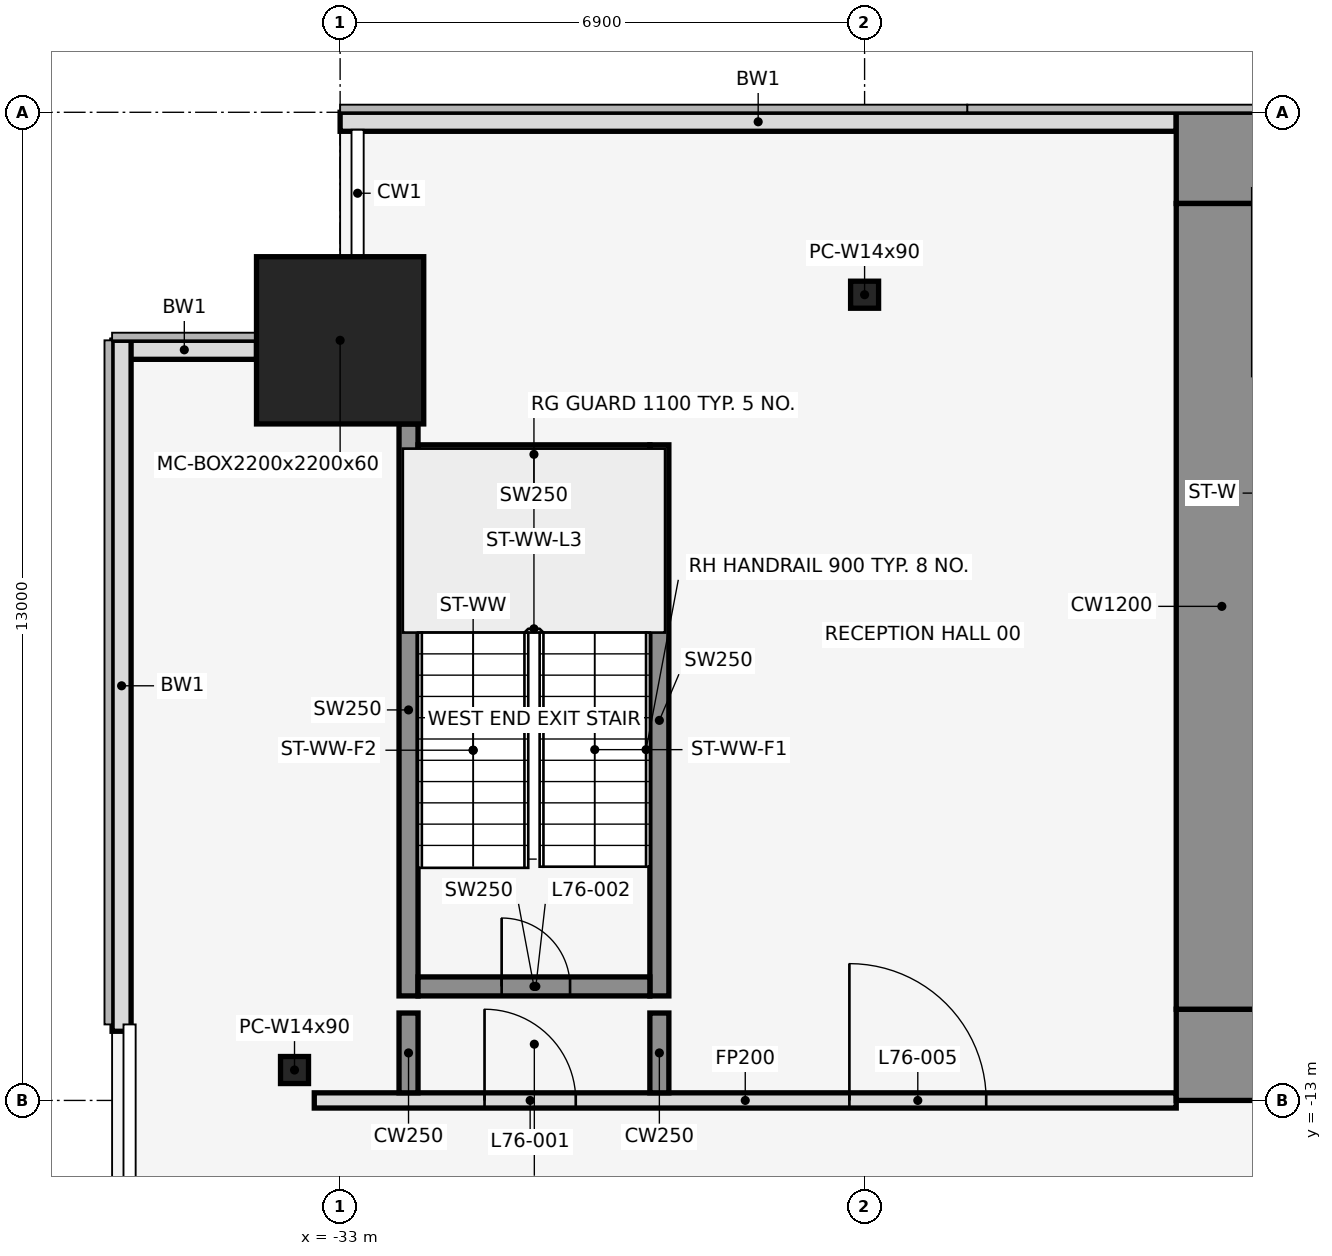
"""IFC4 building model, lengths in metres.
Left out: names, types, materials, properties, quantities, classifications, styles, units other than length and angle.
Written with IfcOpenShell. Run it as: python <this file> out.ifc"""

import sys

from ifc_helpers import new_model, si_unit, direction, frame, frame_2d, origin, origin_2d, place, context, subcontext, project, spatial, rectangle, hollow_rectangle, i_section, extrude, element, fill, save


model = new_model("IFC4")
c1 = context("Model", 3, precision=1e-05, world=origin(), true_north=direction((0.0, 1.0)))
c2 = subcontext(c1, "Body", "Model", "MODEL_VIEW")
j1 = project(units=[si_unit("LENGTHUNIT", "METRE"), si_unit("PLANEANGLEUNIT", "RADIAN")], contexts=[c1])
p1 = place(None, origin())
s1 = spatial("IfcSite", under=j1, at=p1, CompositionType="ELEMENT")
p2 = place(p1, origin())
s2 = spatial("IfcBuilding", under=s1, at=p2, CompositionType="ELEMENT")
p3 = place(p2, frame((0.0, 0.0, 338.0)))
s3 = spatial("IfcBuildingStorey", under=s2, at=p3, CompositionType="ELEMENT", Elevation=338.0)
p4 = place(p3, frame((-33.0, -3.0, 0.0), z_axis=(0.0, 0.0, 1.0), x_axis=(1.0, 0.0, 0.0)))
e1 = element("IfcColumn", 1, at=p4, inside=s3, PredefinedType="COLUMN", context=c2, shape_type="SweptSolid", body=[
    extrude(hollow_rectangle(XDim=2.2, YDim=2.2, WallThickness=0.06, at=origin_2d()), origin(), (0.0, 0.0, 1.0), 4.5),
])
for number, where, z_axis, x_axis in (
    (2, (-26.1, -2.4, 0.0), (0.0, 0.0, 1.0), (1.0, 0.0, 0.0)),
    (3, (-33.6, -12.6, 0.0), (0.0, 0.0, 1.0), (1.0, 0.0, 0.0)),
):
    element("IfcColumn", number, at=place(p3, frame(where, z_axis=z_axis, x_axis=x_axis)), inside=s3, PredefinedType="COLUMN", context=c2, shape_type="SweptSolid", body=[
        extrude(i_section(OverallWidth=0.368, OverallDepth=0.356, WebThickness=0.011, FlangeThickness=0.018, at=origin_2d()), origin(), (0.0, 0.0, 1.0), 4.5),
    ])
p5 = place(p3, frame((-22.0, -0.125, 0.0), z_axis=(0.0, 0.0, 1.0), x_axis=(-1.0, 0.0, 0.0)))
e4 = element("IfcWall", 4, at=p5, inside=s3, PredefinedType="STANDARD", context=c2, shape_type="SweptSolid", body=[
    extrude(rectangle(XDim=11.0, YDim=0.25, at=frame_2d((5.5, 0.0))), origin(), (0.0, 0.0, 1.0), 4.3),
])
p6 = place(p3, frame((-34.1, -3.125, 0.0), z_axis=(0.0, 0.0, 1.0), x_axis=(-1.0, 0.0, 0.0)))
e5 = element("IfcWall", 5, at=p6, inside=s3, PredefinedType="STANDARD", context=c2, shape_type="SweptSolid", body=[
    extrude(rectangle(XDim=1.9, YDim=0.25, at=frame_2d((0.95, 0.0))), origin(), (0.0, 0.0, 1.0), 4.3),
])
p7 = place(p3, frame((-35.875, -3.0, 0.0), z_axis=(0.0, 0.0, 1.0), x_axis=(0.0, -1.0, 0.0)))
e6 = element("IfcWall", 6, at=p7, inside=s3, PredefinedType="STANDARD", context=c2, shape_type="SweptSolid", body=[
    extrude(rectangle(XDim=9.09, YDim=0.25, at=frame_2d((4.545, 0.0))), origin(), (0.0, 0.0, 1.0), 4.3),
])
p8 = place(p3, frame((-32.1, -11.625, 0.0), z_axis=(0.0, 0.0, 1.0), x_axis=(0.0, 1.0, 0.0)))
e7 = element("IfcWall", 7, at=p8, inside=s3, PredefinedType="SHEAR", context=c2, shape_type="SweptSolid", body=[
    extrude(rectangle(XDim=7.525, YDim=0.25, at=frame_2d((3.762, 0.0))), origin(), (0.0, 0.0, 1.0), 4.5),
])
p9 = place(p3, frame((-28.8, -11.625, 0.0), z_axis=(0.0, 0.0, 1.0), x_axis=(0.0, 1.0, 0.0)))
e8 = element("IfcWall", 8, at=p9, inside=s3, PredefinedType="SHEAR", context=c2, shape_type="SweptSolid", body=[
    extrude(rectangle(XDim=7.25, YDim=0.25, at=frame_2d((3.625, 0.0))), origin(), (0.0, 0.0, 1.0), 4.5),
])
p10 = place(p3, frame((-31.975, -11.5, 0.0), z_axis=(0.0, 0.0, 1.0), x_axis=(1.0, 0.0, 0.0)))
e9 = element("IfcWall", 9, at=p10, inside=s3, PredefinedType="SHEAR", context=c2, shape_type="SweptSolid", body=[
    extrude(rectangle(XDim=3.05, YDim=0.25, at=frame_2d((1.525, 0.0))), origin(), (0.0, 0.0, 1.0), 4.5),
])
p11 = place(p10, frame((1.1, 0.0, 0.0)))
e10 = element("IfcOpeningElement", 10, at=p11, cuts=e9, PredefinedType="OPENING", context=c2, shape_type="SweptSolid", body=[
    extrude(rectangle(XDim=0.9, YDim=2.1, at=frame_2d((0.45, 1.05))), frame((0.0, 0.137, 0.0), z_axis=(0.0, -1.0, 0.0), x_axis=(1.0, 0.0, 0.0)), (0.0, 0.0, 1.0), 0.274),
])
p12 = place(p3, frame((-31.975, -4.5, 0.0), z_axis=(0.0, 0.0, 1.0), x_axis=(1.0, 0.0, 0.0)))
e11 = element("IfcWall", 11, at=p12, inside=s3, PredefinedType="SHEAR", context=c2, shape_type="SweptSolid", body=[
    extrude(rectangle(XDim=3.05, YDim=0.25, at=frame_2d((1.525, 0.0))), origin(), (0.0, 0.0, 1.0), 4.5),
])
p13 = place(p3, frame((-33.34, -13.0, 0.0), z_axis=(0.0, 0.0, 1.0), x_axis=(1.0, 0.0, 0.0)))
e12 = element("IfcWall", 12, at=p13, inside=s3, PredefinedType="PARTITIONING", context=c2, shape_type="SweptSolid", body=[
    extrude(rectangle(XDim=11.34, YDim=0.2, at=frame_2d((5.67, 0.0))), origin(), (0.0, 0.0, 1.0), 3.368),
])
p14 = place(p13, frame((2.24, 0.0, 0.0)))
e13 = element("IfcOpeningElement", 13, at=p14, cuts=e12, PredefinedType="OPENING", context=c2, shape_type="SweptSolid", body=[
    extrude(rectangle(XDim=1.2, YDim=2.1, at=frame_2d((0.6, 1.05))), frame((0.0, 0.112, 0.0), z_axis=(0.0, -1.0, 0.0), x_axis=(1.0, 0.0, 0.0)), (0.0, 0.0, 1.0), 0.224),
])
p15 = place(p13, frame((7.04, 0.0, 0.0)))
e14 = element("IfcOpeningElement", 14, at=p15, cuts=e12, PredefinedType="OPENING", context=c2, shape_type="SweptSolid", body=[
    extrude(rectangle(XDim=1.8, YDim=2.1, at=frame_2d((0.9, 1.05))), frame((0.0, 0.112, 0.0), z_axis=(0.0, -1.0, 0.0), x_axis=(1.0, 0.0, 0.0)), (0.0, 0.0, 1.0), 0.224),
])
for number, where, z_axis, x_axis in (
    (15, (-32.1, -12.9, 0.0), (0.0, 0.0, 1.0), (0.0, 1.0, 0.0)),
    (16, (-28.8, -12.9, 0.0), (0.0, 0.0, 1.0), (0.0, 1.0, 0.0)),
):
    element("IfcWall", number, at=place(p3, frame(where, z_axis=z_axis, x_axis=x_axis)), inside=s3, PredefinedType="SHEAR", context=c2, shape_type="SweptSolid", body=[
        extrude(rectangle(XDim=1.05, YDim=0.25, at=frame_2d((0.525, 0.0))), origin(), (0.0, 0.0, 1.0), 4.5),
    ])
p16 = place(p3, frame((-22.0, -0.6, 0.0), z_axis=(0.0, 0.0, 1.0), x_axis=(1.0, 0.0, 0.0)))
e17 = element("IfcWall", 17, at=p16, inside=s3, PredefinedType="SHEAR", context=c2, shape_type="SweptSolid", body=[
    extrude(rectangle(XDim=44.0, YDim=1.2, at=frame_2d((22.0, 0.0))), origin(), (0.0, 0.0, 1.0), 4.5),
])
p17 = place(p16, frame((18.55, 0.0, 0.0)))
e18 = element("IfcOpeningElement", 18, at=p17, cuts=e17, PredefinedType="OPENING", context=c2, shape_type="SweptSolid", body=[
    extrude(rectangle(XDim=0.9, YDim=2.1, at=frame_2d((0.45, 1.05))), frame((0.0, 0.612, 0.0), z_axis=(0.0, -1.0, 0.0), x_axis=(1.0, 0.0, 0.0)), (0.0, 0.0, 1.0), 1.224),
])
p18 = place(p16, frame((24.55, 0.0, 0.0)))
e19 = element("IfcOpeningElement", 19, at=p18, cuts=e17, PredefinedType="OPENING", context=c2, shape_type="SweptSolid", body=[
    extrude(rectangle(XDim=0.9, YDim=2.1, at=frame_2d((0.45, 1.05))), frame((0.0, 0.612, 0.0), z_axis=(0.0, -1.0, 0.0), x_axis=(1.0, 0.0, 0.0)), (0.0, 0.0, 1.0), 1.224),
])
p19 = place(p3, frame((-22.0, -12.4, 0.0), z_axis=(0.0, 0.0, 1.0), x_axis=(1.0, 0.0, 0.0)))
e20 = element("IfcWall", 20, at=p19, inside=s3, PredefinedType="SHEAR", context=c2, shape_type="SweptSolid", body=[
    extrude(rectangle(XDim=44.0, YDim=1.2, at=frame_2d((22.0, 0.0))), origin(), (0.0, 0.0, 1.0), 4.5),
])
p20 = place(p19, frame((2.2, 0.0, 0.0)))
e21 = element("IfcOpeningElement", 21, at=p20, cuts=e20, PredefinedType="OPENING", context=c2, shape_type="SweptSolid", body=[
    extrude(rectangle(XDim=1.2, YDim=2.1, at=frame_2d((0.6, 1.05))), frame((0.0, 0.612, 0.0), z_axis=(0.0, -1.0, 0.0), x_axis=(1.0, 0.0, 0.0)), (0.0, 0.0, 1.0), 1.224),
])
p21 = place(p19, frame((21.4, 0.0, 0.0)))
e22 = element("IfcOpeningElement", 22, at=p21, cuts=e20, PredefinedType="OPENING", context=c2, shape_type="SweptSolid", body=[
    extrude(rectangle(XDim=1.2, YDim=2.1, at=frame_2d((0.6, 1.05))), frame((0.0, 0.612, 0.0), z_axis=(0.0, -1.0, 0.0), x_axis=(1.0, 0.0, 0.0)), (0.0, 0.0, 1.0), 1.224),
])
p22 = place(p19, frame((40.6, 0.0, 0.0)))
e23 = element("IfcOpeningElement", 23, at=p22, cuts=e20, PredefinedType="OPENING", context=c2, shape_type="SweptSolid", body=[
    extrude(rectangle(XDim=1.2, YDim=2.1, at=frame_2d((0.6, 1.05))), frame((0.0, 0.612, 0.0), z_axis=(0.0, -1.0, 0.0), x_axis=(1.0, 0.0, 0.0)), (0.0, 0.0, 1.0), 1.224),
])
p23 = place(p19, frame((16.0, 0.0, 0.0)))
e24 = element("IfcOpeningElement", 24, at=p23, cuts=e20, PredefinedType="OPENING", context=c2, shape_type="SweptSolid", body=[
    extrude(rectangle(XDim=1.8, YDim=2.1, at=frame_2d((0.9, 1.05))), frame((0.0, 0.612, 0.0), z_axis=(0.0, -1.0, 0.0), x_axis=(1.0, 0.0, 0.0)), (0.0, 0.0, 1.0), 1.224),
])
p24 = place(p19, frame((6.3, 0.0, 0.0)))
e25 = element("IfcOpeningElement", 25, at=p24, cuts=e20, PredefinedType="OPENING", context=c2, shape_type="SweptSolid", body=[
    extrude(rectangle(XDim=1.2, YDim=2.1, at=frame_2d((0.6, 1.05))), frame((0.0, 0.612, 0.0), z_axis=(0.0, -1.0, 0.0), x_axis=(1.0, 0.0, 0.0)), (0.0, 0.0, 1.0), 1.224),
])
p25 = place(p19, frame((26.2, 0.0, 0.0)))
e26 = element("IfcOpeningElement", 26, at=p25, cuts=e20, PredefinedType="OPENING", context=c2, shape_type="SweptSolid", body=[
    extrude(rectangle(XDim=1.8, YDim=2.1, at=frame_2d((0.9, 1.05))), frame((0.0, 0.612, 0.0), z_axis=(0.0, -1.0, 0.0), x_axis=(1.0, 0.0, 0.0)), (0.0, 0.0, 1.0), 1.224),
])
p26 = place(p19, frame((36.5, 0.0, 0.0)))
e27 = element("IfcOpeningElement", 27, at=p26, cuts=e20, PredefinedType="OPENING", context=c2, shape_type="SweptSolid", body=[
    extrude(rectangle(XDim=1.2, YDim=2.1, at=frame_2d((0.6, 1.05))), frame((0.0, 0.612, 0.0), z_axis=(0.0, -1.0, 0.0), x_axis=(1.0, 0.0, 0.0)), (0.0, 0.0, 1.0), 1.224),
])
p27 = place(p3, frame((-21.4, -11.8, 0.0), z_axis=(0.0, 0.0, 1.0), x_axis=(0.0, 1.0, 0.0)))
e28 = element("IfcWall", 28, at=p27, inside=s3, PredefinedType="SHEAR", context=c2, shape_type="SweptSolid", body=[
    extrude(rectangle(XDim=10.6, YDim=1.2, at=frame_2d((5.3, 0.0))), origin(), (0.0, 0.0, 1.0), 4.5),
])
p28 = place(p14, origin())
e29 = element("IfcDoor", 29, at=p28, inside=s3, OperationType="SINGLE_SWING_LEFT", PredefinedType="DOOR", context=c2, shape_type="SweptSolid", body=[
    extrude(rectangle(XDim=1.2, YDim=2.1, at=frame_2d((0.6, 1.05))), frame((0.0, 0.025, 0.0), z_axis=(0.0, -1.0, 0.0), x_axis=(1.0, 0.0, 0.0)), (0.0, 0.0, 1.0), 0.05),
])
fill(e13, e29)
p29 = place(p11, origin())
e30 = element("IfcDoor", 30, at=p29, inside=s3, OperationType="SINGLE_SWING_LEFT", PredefinedType="DOOR", context=c2, shape_type="SweptSolid", body=[
    extrude(rectangle(XDim=0.9, YDim=2.1, at=frame_2d((0.45, 1.05))), frame((0.0, 0.025, 0.0), z_axis=(0.0, -1.0, 0.0), x_axis=(1.0, 0.0, 0.0)), (0.0, 0.0, 1.0), 0.05),
])
fill(e10, e30)
p30 = place(p15, origin())
e31 = element("IfcDoor", 31, at=p30, inside=s3, OperationType="SINGLE_SWING_LEFT", PredefinedType="DOOR", context=c2, shape_type="SweptSolid", body=[
    extrude(rectangle(XDim=1.8, YDim=2.1, at=frame_2d((0.9, 1.05))), frame((0.0, 0.025, 0.0), z_axis=(0.0, -1.0, 0.0), x_axis=(1.0, 0.0, 0.0)), (0.0, 0.0, 1.0), 0.05),
])
fill(e14, e31)
save(model, sys.argv[1])
